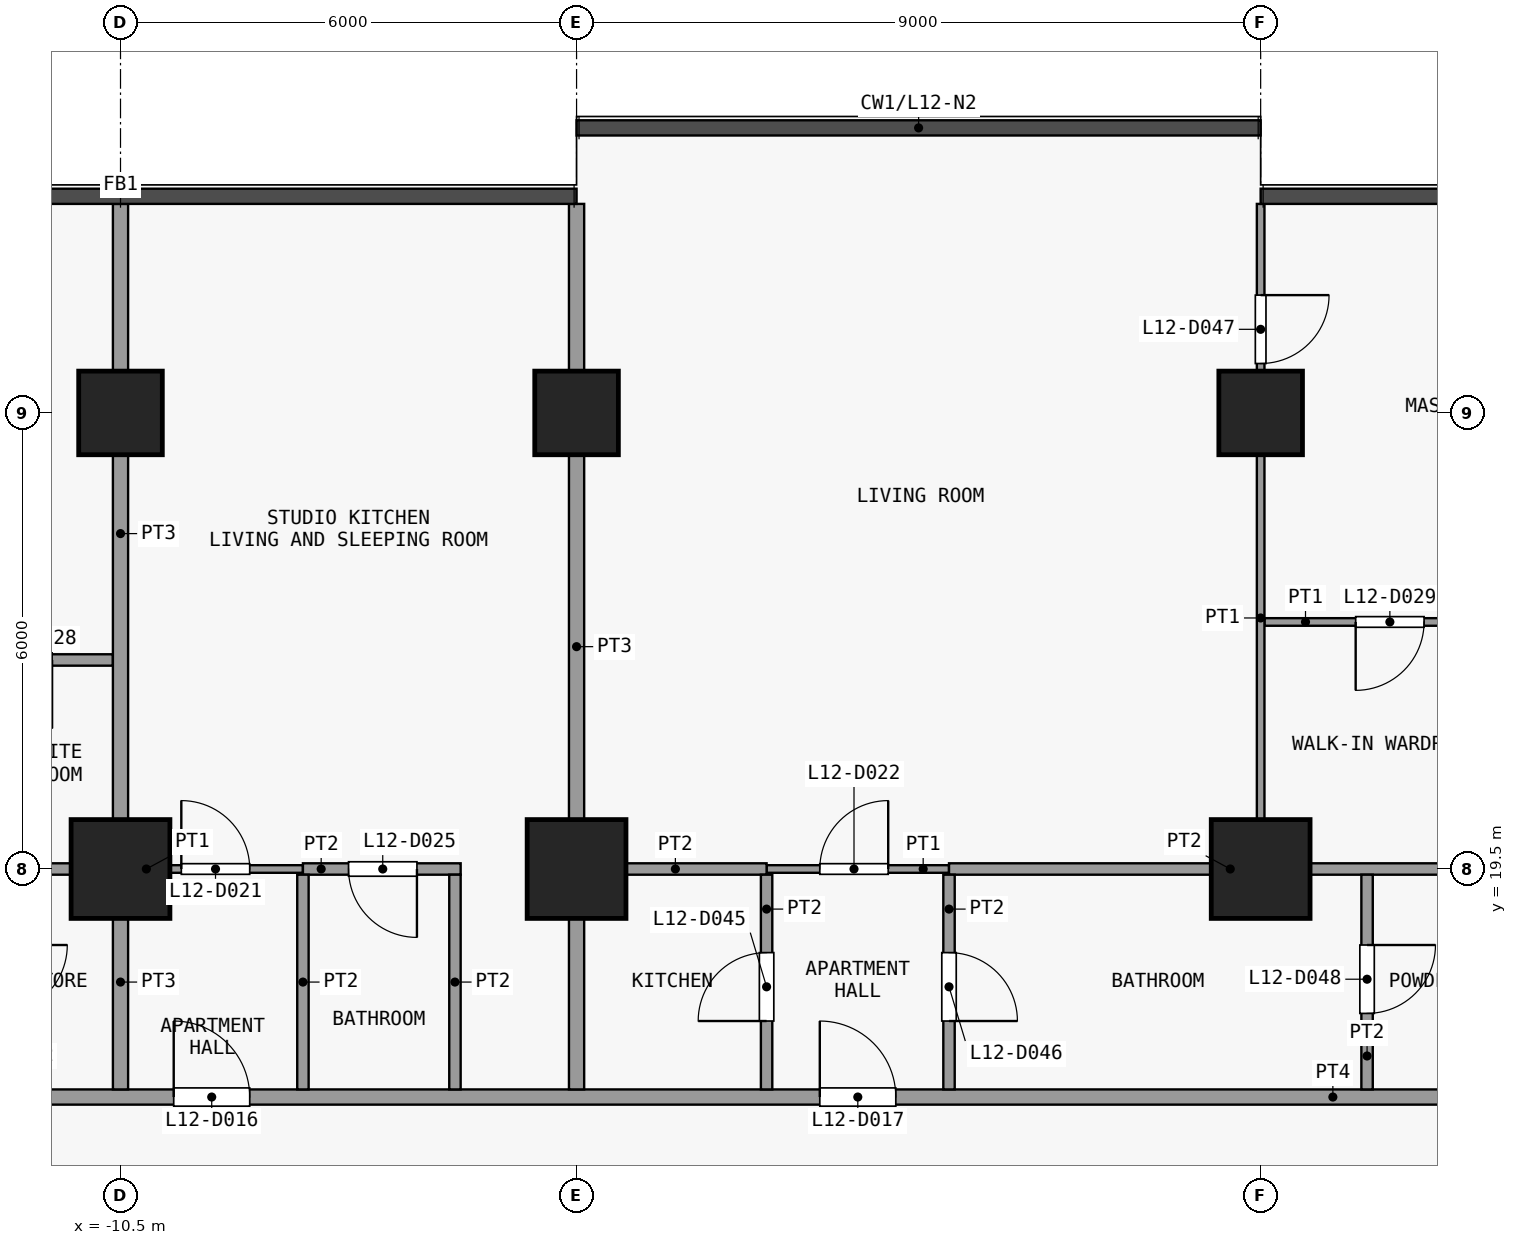
"""IFC4 building model, lengths in metres.
Left out: names, types, materials, properties, quantities, classifications, styles, units other than length and angle.
Written with IfcOpenShell. Run it as: python <this file> out.ifc"""

import sys

from ifc_helpers import new_model, si_unit, direction, frame, frame_2d, origin, origin_2d, place, context, subcontext, project, spatial, rectangle, extrude, element, fill, save


model = new_model("IFC4")
c1 = context("Model", 3, precision=1e-05, world=origin(), true_north=direction((0.0, 1.0)))
c2 = subcontext(c1, "Body", "Model", "MODEL_VIEW")
j1 = project(units=[si_unit("LENGTHUNIT", "METRE"), si_unit("PLANEANGLEUNIT", "RADIAN")], contexts=[c1])
p1 = place(None, origin())
s1 = spatial("IfcSite", under=j1, at=p1, CompositionType="ELEMENT")
p2 = place(p1, origin())
s2 = spatial("IfcBuilding", under=s1, at=p2, CompositionType="ELEMENT")
p3 = place(p2, frame((0.0, 0.0, 54.1)))
s3 = spatial("IfcBuildingStorey", under=s2, at=p3, CompositionType="ELEMENT", Elevation=54.1)
p4 = place(p3, frame((-10.5, 19.5, 0.0), z_axis=(0.0, 0.0, 1.0), x_axis=(1.0, 0.0, 0.0)))
e1 = element("IfcColumn", 1, at=p4, inside=s3, PredefinedType="COLUMN", context=c2, shape_type="SweptSolid", body=[
    extrude(rectangle(XDim=1.3, YDim=1.3, at=origin_2d()), origin(), (0.0, 0.0, 1.0), 3.6),
])
p5 = place(p3, frame((-10.5, 25.5, 0.0), z_axis=(0.0, 0.0, 1.0), x_axis=(1.0, 0.0, 0.0)))
e2 = element("IfcColumn", 2, at=p5, inside=s3, PredefinedType="COLUMN", context=c2, shape_type="SweptSolid", body=[
    extrude(rectangle(XDim=1.1, YDim=1.1, at=origin_2d()), origin(), (0.0, 0.0, 1.0), 3.6),
])
p6 = place(p3, frame((-4.5, 19.5, 0.0), z_axis=(0.0, 0.0, 1.0), x_axis=(1.0, 0.0, 0.0)))
e3 = element("IfcColumn", 3, at=p6, inside=s3, PredefinedType="COLUMN", context=c2, shape_type="SweptSolid", body=[
    extrude(rectangle(XDim=1.3, YDim=1.3, at=origin_2d()), origin(), (0.0, 0.0, 1.0), 3.6),
])
p7 = place(p3, frame((-4.5, 25.5, 0.0), z_axis=(0.0, 0.0, 1.0), x_axis=(1.0, 0.0, 0.0)))
e4 = element("IfcColumn", 4, at=p7, inside=s3, PredefinedType="COLUMN", context=c2, shape_type="SweptSolid", body=[
    extrude(rectangle(XDim=1.1, YDim=1.1, at=origin_2d()), origin(), (0.0, 0.0, 1.0), 3.6),
])
p8 = place(p3, frame((4.5, 19.5, 0.0), z_axis=(0.0, 0.0, 1.0), x_axis=(1.0, 0.0, 0.0)))
e5 = element("IfcColumn", 5, at=p8, inside=s3, PredefinedType="COLUMN", context=c2, shape_type="SweptSolid", body=[
    extrude(rectangle(XDim=1.3, YDim=1.3, at=origin_2d()), origin(), (0.0, 0.0, 1.0), 3.6),
])
p9 = place(p3, frame((4.5, 25.5, 0.0), z_axis=(0.0, 0.0, 1.0), x_axis=(1.0, 0.0, 0.0)))
e6 = element("IfcColumn", 6, at=p9, inside=s3, PredefinedType="COLUMN", context=c2, shape_type="SweptSolid", body=[
    extrude(rectangle(XDim=1.1, YDim=1.1, at=origin_2d()), origin(), (0.0, 0.0, 1.0), 3.6),
])
p10 = place(p3, frame((-25.35, 16.5, 0.0), z_axis=(0.0, 0.0, 1.0), x_axis=(1.0, 0.0, 0.0)))
e7 = element("IfcWall", 7, at=p10, inside=s3, PredefinedType="PARTITIONING", context=c2, shape_type="SweptSolid", body=[
    extrude(rectangle(XDim=49.2, YDim=0.2, at=frame_2d((24.6, 0.0))), origin(), (0.0, 0.0, 1.0), 3.3),
])
p11 = place(p10, frame((7.05, 0.0, 0.0)))
e8 = element("IfcOpeningElement", 8, at=p11, cuts=e7, PredefinedType="OPENING", context=c2, shape_type="SweptSolid", body=[
    extrude(rectangle(XDim=1.0, YDim=2.1, at=frame_2d((0.5, 1.05))), frame((0.0, 0.11, 0.0), z_axis=(0.0, -1.0, 0.0), x_axis=(1.0, 0.0, 0.0)), (0.0, 0.0, 1.0), 0.22),
])
p12 = place(p10, frame((15.55, 0.0, 0.0)))
e9 = element("IfcOpeningElement", 9, at=p12, cuts=e7, PredefinedType="OPENING", context=c2, shape_type="SweptSolid", body=[
    extrude(rectangle(XDim=1.0, YDim=2.1, at=frame_2d((0.5, 1.05))), frame((0.0, 0.11, 0.0), z_axis=(0.0, -1.0, 0.0), x_axis=(1.0, 0.0, 0.0)), (0.0, 0.0, 1.0), 0.22),
])
p13 = place(p10, frame((24.05, 0.0, 0.0)))
e10 = element("IfcOpeningElement", 10, at=p13, cuts=e7, PredefinedType="OPENING", context=c2, shape_type="SweptSolid", body=[
    extrude(rectangle(XDim=1.0, YDim=2.1, at=frame_2d((0.5, 1.05))), frame((0.0, 0.11, 0.0), z_axis=(0.0, -1.0, 0.0), x_axis=(1.0, 0.0, 0.0)), (0.0, 0.0, 1.0), 0.22),
])
p14 = place(p10, frame((36.55, 0.0, 0.0)))
e11 = element("IfcOpeningElement", 11, at=p14, cuts=e7, PredefinedType="OPENING", context=c2, shape_type="SweptSolid", body=[
    extrude(rectangle(XDim=1.0, YDim=2.1, at=frame_2d((0.5, 1.05))), frame((0.0, 0.11, 0.0), z_axis=(0.0, -1.0, 0.0), x_axis=(1.0, 0.0, 0.0)), (0.0, 0.0, 1.0), 0.22),
])
p15 = place(p10, frame((45.05, 0.0, 0.0)))
e12 = element("IfcOpeningElement", 12, at=p15, cuts=e7, PredefinedType="OPENING", context=c2, shape_type="SweptSolid", body=[
    extrude(rectangle(XDim=1.0, YDim=2.1, at=frame_2d((0.5, 1.05))), frame((0.0, 0.11, 0.0), z_axis=(0.0, -1.0, 0.0), x_axis=(1.0, 0.0, 0.0)), (0.0, 0.0, 1.0), 0.22),
])
p16 = place(p3, frame((-10.5, 19.5, 0.0), z_axis=(0.0, 0.0, 1.0), x_axis=(1.0, 0.0, 0.0)))
e13 = element("IfcWall", 13, at=p16, inside=s3, PredefinedType="PARTITIONING", context=c2, shape_type="SweptSolid", body=[
    extrude(rectangle(XDim=2.4, YDim=0.1, at=frame_2d((1.2, 0.0))), origin(), (0.0, 0.0, 1.0), 3.3),
])
p17 = place(p16, frame((0.8, 0.0, 0.0)))
e14 = element("IfcOpeningElement", 14, at=p17, cuts=e13, PredefinedType="OPENING", context=c2, shape_type="SweptSolid", body=[
    extrude(rectangle(XDim=0.9, YDim=2.1, at=frame_2d((0.45, 1.05))), frame((0.0, 0.06, 0.0), z_axis=(0.0, -1.0, 0.0), x_axis=(1.0, 0.0, 0.0)), (0.0, 0.0, 1.0), 0.12),
])
p18 = place(p3, frame((-2.0, 19.5, 0.0), z_axis=(0.0, 0.0, 1.0), x_axis=(1.0, 0.0, 0.0)))
e15 = element("IfcWall", 15, at=p18, inside=s3, PredefinedType="PARTITIONING", context=c2, shape_type="SweptSolid", body=[
    extrude(rectangle(XDim=2.4, YDim=0.1, at=frame_2d((1.2, 0.0))), origin(), (0.0, 0.0, 1.0), 3.3),
])
p19 = place(p18, frame((0.7, 0.0, 0.0)))
e16 = element("IfcOpeningElement", 16, at=p19, cuts=e15, PredefinedType="OPENING", context=c2, shape_type="SweptSolid", body=[
    extrude(rectangle(XDim=0.9, YDim=2.1, at=frame_2d((0.45, 1.05))), frame((0.0, 0.06, 0.0), z_axis=(0.0, -1.0, 0.0), x_axis=(1.0, 0.0, 0.0)), (0.0, 0.0, 1.0), 0.12),
])
p20 = place(p3, frame((-13.2, 19.5, 0.0), z_axis=(0.0, 0.0, 1.0), x_axis=(1.0, 0.0, 0.0)))
e17 = element("IfcWall", 17, at=p20, inside=s3, PredefinedType="PARTITIONING", context=c2, shape_type="SweptSolid", body=[
    extrude(rectangle(XDim=2.7, YDim=0.15, at=frame_2d((1.35, 0.0))), origin(), (0.0, 0.0, 1.0), 3.3),
])
p21 = place(p3, frame((-8.1, 19.5, 0.0), z_axis=(0.0, 0.0, 1.0), x_axis=(1.0, 0.0, 0.0)))
e18 = element("IfcWall", 18, at=p21, inside=s3, PredefinedType="PARTITIONING", context=c2, shape_type="SweptSolid", body=[
    extrude(rectangle(XDim=2.075, YDim=0.15, at=frame_2d((1.038, 0.0))), origin(), (0.0, 0.0, 1.0), 3.3),
])
p22 = place(p21, frame((0.6, 0.0, 0.0)))
e19 = element("IfcOpeningElement", 19, at=p22, cuts=e18, PredefinedType="OPENING", context=c2, shape_type="SweptSolid", body=[
    extrude(rectangle(XDim=0.9, YDim=2.1, at=frame_2d((0.45, 1.05))), frame((0.0, 0.085, 0.0), z_axis=(0.0, -1.0, 0.0), x_axis=(1.0, 0.0, 0.0)), (0.0, 0.0, 1.0), 0.17),
])
p23 = place(p3, frame((-4.4, 19.5, 0.0), z_axis=(0.0, 0.0, 1.0), x_axis=(1.0, 0.0, 0.0)))
e20 = element("IfcWall", 20, at=p23, inside=s3, PredefinedType="PARTITIONING", context=c2, shape_type="SweptSolid", body=[
    extrude(rectangle(XDim=2.4, YDim=0.15, at=frame_2d((1.2, 0.0))), origin(), (0.0, 0.0, 1.0), 3.3),
])
p24 = place(p3, frame((0.4, 19.5, 0.0), z_axis=(0.0, 0.0, 1.0), x_axis=(1.0, 0.0, 0.0)))
e21 = element("IfcWall", 21, at=p24, inside=s3, PredefinedType="PARTITIONING", context=c2, shape_type="SweptSolid", body=[
    extrude(rectangle(XDim=7.4, YDim=0.15, at=frame_2d((3.7, 0.0))), origin(), (0.0, 0.0, 1.0), 3.3),
])
p25 = place(p3, frame((-13.2, 22.25, 0.0), z_axis=(0.0, 0.0, 1.0), x_axis=(1.0, 0.0, 0.0)))
e22 = element("IfcWall", 22, at=p25, inside=s3, PredefinedType="PARTITIONING", context=c2, shape_type="SweptSolid", body=[
    extrude(rectangle(XDim=2.6, YDim=0.15, at=frame_2d((1.3, 0.0))), origin(), (0.0, 0.0, 1.0), 3.3),
])
p26 = place(p25, frame((0.9, 0.0, 0.0)))
e23 = element("IfcOpeningElement", 23, at=p26, cuts=e22, PredefinedType="OPENING", context=c2, shape_type="SweptSolid", body=[
    extrude(rectangle(XDim=0.9, YDim=2.1, at=frame_2d((0.45, 1.05))), frame((0.0, 0.085, 0.0), z_axis=(0.0, -1.0, 0.0), x_axis=(1.0, 0.0, 0.0)), (0.0, 0.0, 1.0), 0.17),
])
p27 = place(p3, frame((4.55, 22.75, 0.0), z_axis=(0.0, 0.0, 1.0), x_axis=(1.0, 0.0, 0.0)))
e24 = element("IfcWall", 24, at=p27, inside=s3, PredefinedType="PARTITIONING", context=c2, shape_type="SweptSolid", body=[
    extrude(rectangle(XDim=3.25, YDim=0.1, at=frame_2d((1.625, 0.0))), origin(), (0.0, 0.0, 1.0), 3.3),
])
p28 = place(p27, frame((1.2, 0.0, 0.0)))
e25 = element("IfcOpeningElement", 25, at=p28, cuts=e24, PredefinedType="OPENING", context=c2, shape_type="SweptSolid", body=[
    extrude(rectangle(XDim=0.9, YDim=2.1, at=frame_2d((0.45, 1.05))), frame((0.0, 0.06, 0.0), z_axis=(0.0, -1.0, 0.0), x_axis=(1.0, 0.0, 0.0)), (0.0, 0.0, 1.0), 0.12),
])
p29 = place(p3, frame((-10.5, 16.6, 0.0), z_axis=(0.0, 0.0, 1.0), x_axis=(0.0, 1.0, 0.0)))
e26 = element("IfcWall", 26, at=p29, inside=s3, PredefinedType="PARTITIONING", context=c2, shape_type="SweptSolid", body=[
    extrude(rectangle(XDim=2.825, YDim=0.2, at=frame_2d((1.413, 0.0))), origin(), (0.0, 0.0, 1.0), 3.3),
])
p30 = place(p3, frame((-10.5, 19.575, 0.0), z_axis=(0.0, 0.0, 1.0), x_axis=(0.0, 1.0, 0.0)))
e27 = element("IfcWall", 27, at=p30, inside=s3, PredefinedType="PARTITIONING", context=c2, shape_type="SweptSolid", body=[
    extrude(rectangle(XDim=8.675, YDim=0.2, at=frame_2d((4.337, 0.0))), origin(), (0.0, 0.0, 1.0), 3.3),
])
for number, where, z_axis, x_axis in (
    (28, (-8.1, 16.6, 0.0), (0.0, 0.0, 1.0), (0.0, 1.0, 0.0)),
    (29, (-6.1, 16.6, 0.0), (0.0, 0.0, 1.0), (0.0, 1.0, 0.0)),
):
    element("IfcWall", number, at=place(p3, frame(where, z_axis=z_axis, x_axis=x_axis)), inside=s3, PredefinedType="PARTITIONING", context=c2, shape_type="SweptSolid", body=[
        extrude(rectangle(XDim=2.825, YDim=0.15, at=frame_2d((1.413, 0.0))), origin(), (0.0, 0.0, 1.0), 3.3),
    ])
p31 = place(p3, frame((-4.5, 16.6, 0.0), z_axis=(0.0, 0.0, 1.0), x_axis=(0.0, 1.0, 0.0)))
e30 = element("IfcWall", 30, at=p31, inside=s3, PredefinedType="PARTITIONING", context=c2, shape_type="SweptSolid", body=[
    extrude(rectangle(XDim=11.65, YDim=0.2, at=frame_2d((5.825, 0.0))), origin(), (0.0, 0.0, 1.0), 3.3),
])
p32 = place(p3, frame((-2.0, 16.6, 0.0), z_axis=(0.0, 0.0, 1.0), x_axis=(0.0, 1.0, 0.0)))
e31 = element("IfcWall", 31, at=p32, inside=s3, PredefinedType="PARTITIONING", context=c2, shape_type="SweptSolid", body=[
    extrude(rectangle(XDim=2.825, YDim=0.15, at=frame_2d((1.413, 0.0))), origin(), (0.0, 0.0, 1.0), 3.3),
])
p33 = place(p32, frame((0.9, 0.0, 0.0)))
e32 = element("IfcOpeningElement", 32, at=p33, cuts=e31, PredefinedType="OPENING", context=c2, shape_type="SweptSolid", body=[
    extrude(rectangle(XDim=0.9, YDim=2.1, at=frame_2d((0.45, 1.05))), frame((0.0, 0.085, 0.0), z_axis=(0.0, -1.0, 0.0), x_axis=(1.0, 0.0, 0.0)), (0.0, 0.0, 1.0), 0.17),
])
p34 = place(p3, frame((0.4, 16.6, 0.0), z_axis=(0.0, 0.0, 1.0), x_axis=(0.0, 1.0, 0.0)))
e33 = element("IfcWall", 33, at=p34, inside=s3, PredefinedType="PARTITIONING", context=c2, shape_type="SweptSolid", body=[
    extrude(rectangle(XDim=2.825, YDim=0.15, at=frame_2d((1.413, 0.0))), origin(), (0.0, 0.0, 1.0), 3.3),
])
p35 = place(p34, frame((0.9, 0.0, 0.0)))
e34 = element("IfcOpeningElement", 34, at=p35, cuts=e33, PredefinedType="OPENING", context=c2, shape_type="SweptSolid", body=[
    extrude(rectangle(XDim=0.9, YDim=2.1, at=frame_2d((0.45, 1.05))), frame((0.0, 0.085, 0.0), z_axis=(0.0, -1.0, 0.0), x_axis=(1.0, 0.0, 0.0)), (0.0, 0.0, 1.0), 0.17),
])
p36 = place(p3, frame((4.5, 19.575, 0.0), z_axis=(0.0, 0.0, 1.0), x_axis=(0.0, 1.0, 0.0)))
e35 = element("IfcWall", 35, at=p36, inside=s3, PredefinedType="PARTITIONING", context=c2, shape_type="SweptSolid", body=[
    extrude(rectangle(XDim=8.675, YDim=0.1, at=frame_2d((4.337, 0.0))), origin(), (0.0, 0.0, 1.0), 3.3),
])
p37 = place(p36, frame((6.575, 0.0, 0.0)))
e36 = element("IfcOpeningElement", 36, at=p37, cuts=e35, PredefinedType="OPENING", context=c2, shape_type="SweptSolid", body=[
    extrude(rectangle(XDim=0.9, YDim=2.1, at=frame_2d((0.45, 1.05))), frame((0.0, 0.06, 0.0), z_axis=(0.0, -1.0, 0.0), x_axis=(1.0, 0.0, 0.0)), (0.0, 0.0, 1.0), 0.12),
])
p38 = place(p3, frame((5.9, 16.6, 0.0), z_axis=(0.0, 0.0, 1.0), x_axis=(0.0, 1.0, 0.0)))
e37 = element("IfcWall", 37, at=p38, inside=s3, PredefinedType="PARTITIONING", context=c2, shape_type="SweptSolid", body=[
    extrude(rectangle(XDim=2.825, YDim=0.15, at=frame_2d((1.413, 0.0))), origin(), (0.0, 0.0, 1.0), 3.3),
])
p39 = place(p38, frame((1.0, 0.0, 0.0)))
e38 = element("IfcOpeningElement", 38, at=p39, cuts=e37, PredefinedType="OPENING", context=c2, shape_type="SweptSolid", body=[
    extrude(rectangle(XDim=0.9, YDim=2.1, at=frame_2d((0.45, 1.05))), frame((0.0, 0.085, 0.0), z_axis=(0.0, -1.0, 0.0), x_axis=(1.0, 0.0, 0.0)), (0.0, 0.0, 1.0), 0.17),
])
p40 = place(p12, origin())
e39 = element("IfcDoor", 39, at=p40, inside=s3, OperationType="SINGLE_SWING_RIGHT", PredefinedType="DOOR", context=c2, shape_type="SweptSolid", body=[
    extrude(rectangle(XDim=1.0, YDim=2.1, at=frame_2d((0.5, 1.05))), frame((0.0, 0.025, 0.0), z_axis=(0.0, -1.0, 0.0), x_axis=(1.0, 0.0, 0.0)), (0.0, 0.0, 1.0), 0.05),
])
fill(e9, e39)
p41 = place(p13, origin())
e40 = element("IfcDoor", 40, at=p41, inside=s3, OperationType="SINGLE_SWING_RIGHT", PredefinedType="DOOR", context=c2, shape_type="SweptSolid", body=[
    extrude(rectangle(XDim=1.0, YDim=2.1, at=frame_2d((0.5, 1.05))), frame((0.0, 0.025, 0.0), z_axis=(0.0, -1.0, 0.0), x_axis=(1.0, 0.0, 0.0)), (0.0, 0.0, 1.0), 0.05),
])
fill(e10, e40)
p42 = place(p17, origin())
e41 = element("IfcDoor", 41, at=p42, inside=s3, OperationType="SINGLE_SWING_RIGHT", PredefinedType="DOOR", context=c2, shape_type="SweptSolid", body=[
    extrude(rectangle(XDim=0.9, YDim=2.1, at=frame_2d((0.45, 1.05))), frame((0.0, 0.025, 0.0), z_axis=(0.0, -1.0, 0.0), x_axis=(1.0, 0.0, 0.0)), (0.0, 0.0, 1.0), 0.05),
])
fill(e14, e41)
p43 = place(p19, origin())
e42 = element("IfcDoor", 42, at=p43, inside=s3, OperationType="SINGLE_SWING_LEFT", PredefinedType="DOOR", context=c2, shape_type="SweptSolid", body=[
    extrude(rectangle(XDim=0.9, YDim=2.1, at=frame_2d((0.45, 1.05))), frame((0.0, 0.025, 0.0), z_axis=(0.0, -1.0, 0.0), x_axis=(1.0, 0.0, 0.0)), (0.0, 0.0, 1.0), 0.05),
])
fill(e16, e42)
p44 = place(p22, origin())
e43 = element("IfcDoor", 43, at=p44, inside=s3, OperationType="SINGLE_SWING_RIGHT", PredefinedType="DOOR", context=c2, shape_type="SweptSolid", body=[
    extrude(rectangle(XDim=0.9, YDim=2.1, at=frame_2d((0.45, 1.05))), frame((0.0, 0.025, 0.0), z_axis=(0.0, -1.0, 0.0), x_axis=(1.0, 0.0, 0.0)), (0.0, 0.0, 1.0), 0.05),
])
fill(e19, e43)
p45 = place(p28, origin())
e44 = element("IfcDoor", 44, at=p45, inside=s3, OperationType="SINGLE_SWING_LEFT", PredefinedType="DOOR", context=c2, shape_type="SweptSolid", body=[
    extrude(rectangle(XDim=0.9, YDim=2.1, at=frame_2d((0.45, 1.05))), frame((0.0, 0.025, 0.0), z_axis=(0.0, -1.0, 0.0), x_axis=(1.0, 0.0, 0.0)), (0.0, 0.0, 1.0), 0.05),
])
fill(e25, e44)
p46 = place(p33, origin())
e45 = element("IfcDoor", 45, at=p46, inside=s3, OperationType="SINGLE_SWING_RIGHT", PredefinedType="DOOR", context=c2, shape_type="SweptSolid", body=[
    extrude(rectangle(XDim=0.9, YDim=2.1, at=frame_2d((0.45, 1.05))), frame((0.0, 0.025, 0.0), z_axis=(0.0, -1.0, 0.0), x_axis=(1.0, 0.0, 0.0)), (0.0, 0.0, 1.0), 0.05),
])
fill(e32, e45)
p47 = place(p35, origin())
e46 = element("IfcDoor", 46, at=p47, inside=s3, OperationType="SINGLE_SWING_LEFT", PredefinedType="DOOR", context=c2, shape_type="SweptSolid", body=[
    extrude(rectangle(XDim=0.9, YDim=2.1, at=frame_2d((0.45, 1.05))), frame((0.0, 0.025, 0.0), z_axis=(0.0, -1.0, 0.0), x_axis=(1.0, 0.0, 0.0)), (0.0, 0.0, 1.0), 0.05),
])
fill(e34, e46)
p48 = place(p37, origin())
e47 = element("IfcDoor", 47, at=p48, inside=s3, OperationType="SINGLE_SWING_RIGHT", PredefinedType="DOOR", context=c2, shape_type="SweptSolid", body=[
    extrude(rectangle(XDim=0.9, YDim=2.1, at=frame_2d((0.45, 1.05))), frame((0.0, 0.025, 0.0), z_axis=(0.0, -1.0, 0.0), x_axis=(1.0, 0.0, 0.0)), (0.0, 0.0, 1.0), 0.05),
])
fill(e36, e47)
p49 = place(p39, origin())
e48 = element("IfcDoor", 48, at=p49, inside=s3, OperationType="SINGLE_SWING_RIGHT", PredefinedType="DOOR", context=c2, shape_type="SweptSolid", body=[
    extrude(rectangle(XDim=0.9, YDim=2.1, at=frame_2d((0.45, 1.05))), frame((0.0, 0.025, 0.0), z_axis=(0.0, -1.0, 0.0), x_axis=(1.0, 0.0, 0.0)), (0.0, 0.0, 1.0), 0.05),
])
fill(e38, e48)
save(model, sys.argv[1])
